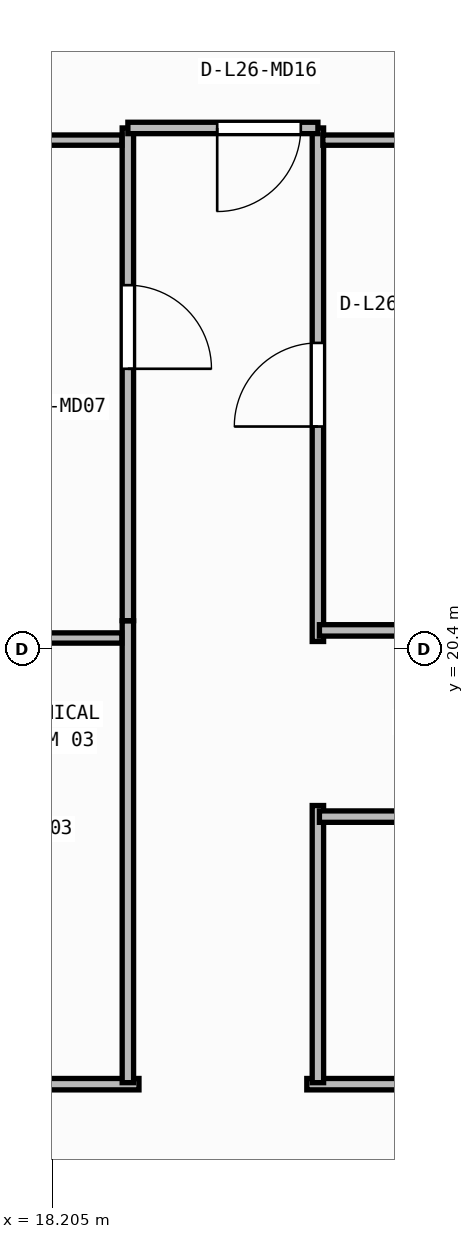
"""IFC4 building model, lengths in metres.
Left out: names, types, materials, properties, quantities, classifications, styles, units other than length and angle.
Written with IfcOpenShell. Run it as: python <this file> out.ifc"""

import sys

from ifc_helpers import new_model, si_unit, direction, frame, frame_2d, origin, place, context, subcontext, project, spatial, rectangle, extrude, element, fill, save


model = new_model("IFC4")
c1 = context("Model", 3, precision=1e-05, world=origin(), true_north=direction((0.0, 1.0)))
c2 = subcontext(c1, "Body", "Model", "MODEL_VIEW")
j1 = project(units=[si_unit("LENGTHUNIT", "METRE"), si_unit("PLANEANGLEUNIT", "RADIAN")], contexts=[c1])
p1 = place(None, origin())
s1 = spatial("IfcSite", under=j1, at=p1, CompositionType="ELEMENT")
p2 = place(p1, origin())
s2 = spatial("IfcBuilding", under=s1, at=p2, CompositionType="ELEMENT")
p3 = place(p2, frame((0.0, 0.0, 107.3)))
s3 = spatial("IfcBuildingStorey", under=s2, at=p3, CompositionType="ELEMENT", Elevation=107.3)
p4 = place(p3, frame((19.346, 14.68, 0.0), z_axis=(0.0, 0.0, 1.0), x_axis=(-1.0, 0.0, 0.0)))
e1 = element("IfcWall", 1, at=p4, inside=s3, PredefinedType="PARTITIONING", context=c2, shape_type="SweptSolid", body=[
    extrude(rectangle(XDim=4.778, YDim=0.15, at=frame_2d((2.389, 0.0))), origin(), (0.0, 0.0, 1.0), 3.71),
])
p5 = place(p4, frame((1.839, 0.0, 0.0)))
e2 = element("IfcOpeningElement", 2, at=p5, cuts=e1, PredefinedType="OPENING", context=c2, shape_type="SweptSolid", body=[
    extrude(rectangle(XDim=1.1, YDim=2.1, at=frame_2d((0.55, 1.05))), frame((0.0, 0.085, 0.0), z_axis=(0.0, -1.0, 0.0), x_axis=(1.0, 0.0, 0.0)), (0.0, 0.0, 1.0), 0.17),
])
p6 = place(p3, frame((32.006, 14.68, 0.0), z_axis=(0.0, 0.0, 1.0), x_axis=(-1.0, 0.0, 0.0)))
e3 = element("IfcWall", 3, at=p6, inside=s3, PredefinedType="PARTITIONING", context=c2, shape_type="SweptSolid", body=[
    extrude(rectangle(XDim=10.452, YDim=0.15, at=frame_2d((5.226, 0.0))), origin(), (0.0, 0.0, 1.0), 3.71),
])
p7 = place(p6, frame((4.676, 0.0, 0.0)))
e4 = element("IfcOpeningElement", 4, at=p7, cuts=e3, PredefinedType="OPENING", context=c2, shape_type="SweptSolid", body=[
    extrude(rectangle(XDim=1.1, YDim=2.1, at=frame_2d((0.55, 1.05))), frame((0.0, 0.085, 0.0), z_axis=(0.0, -1.0, 0.0), x_axis=(1.0, 0.0, 0.0)), (0.0, 0.0, 1.0), 0.17),
])
p8 = place(p3, frame((19.2, 20.776, 0.0), z_axis=(0.0, 0.0, 1.0), x_axis=(0.0, -1.0, 0.0)))
e5 = element("IfcWall", 5, at=p8, inside=s3, PredefinedType="PARTITIONING", context=c2, shape_type="SweptSolid", body=[
    extrude(rectangle(XDim=6.076, YDim=0.15, at=frame_2d((3.038, 0.0))), origin(), (0.0, 0.0, 1.0), 3.71),
])
p9 = place(p3, frame((21.7, 14.7, 0.0), z_axis=(0.0, 0.0, 1.0), x_axis=(0.0, 1.0, 0.0)))
e6 = element("IfcWall", 6, at=p9, inside=s3, PredefinedType="PARTITIONING", context=c2, shape_type="SweptSolid", body=[
    extrude(rectangle(XDim=3.646, YDim=0.15, at=frame_2d((1.823, 0.0))), origin(), (0.0, 0.0, 1.0), 3.71),
])
p10 = place(p3, frame((19.2, 27.26, 0.0), z_axis=(0.0, 0.0, 1.0), x_axis=(0.0, -1.0, 0.0)))
e7 = element("IfcWall", 7, at=p10, inside=s3, PredefinedType="PARTITIONING", context=c2, shape_type="SweptSolid", body=[
    extrude(rectangle(XDim=6.482, YDim=0.15, at=frame_2d((3.241, 0.0))), origin(), (0.0, 0.0, 1.0), 3.71),
])
p11 = place(p10, frame((2.068, 0.0, 0.0)))
e8 = element("IfcOpeningElement", 8, at=p11, cuts=e7, PredefinedType="OPENING", context=c2, shape_type="SweptSolid", body=[
    extrude(rectangle(XDim=1.1, YDim=2.1, at=frame_2d((0.55, 1.05))), frame((0.0, 0.085, 0.0), z_axis=(0.0, -1.0, 0.0), x_axis=(1.0, 0.0, 0.0)), (0.0, 0.0, 1.0), 0.17),
])
p12 = place(p3, frame((21.7, 20.504, 0.0), z_axis=(0.0, 0.0, 1.0), x_axis=(0.0, 1.0, 0.0)))
e9 = element("IfcWall", 9, at=p12, inside=s3, PredefinedType="PARTITIONING", context=c2, shape_type="SweptSolid", body=[
    extrude(rectangle(XDim=6.756, YDim=0.15, at=frame_2d((3.378, 0.0))), origin(), (0.0, 0.0, 1.0), 3.71),
])
p13 = place(p12, frame((2.828, 0.0, 0.0)))
e10 = element("IfcOpeningElement", 10, at=p13, cuts=e9, PredefinedType="OPENING", context=c2, shape_type="SweptSolid", body=[
    extrude(rectangle(XDim=1.1, YDim=2.1, at=frame_2d((0.55, 1.05))), frame((0.0, 0.085, 0.0), z_axis=(0.0, -1.0, 0.0), x_axis=(1.0, 0.0, 0.0)), (0.0, 0.0, 1.0), 0.17),
])
p14 = place(p3, frame((21.7, 27.26, 0.0), z_axis=(0.0, 0.0, 1.0), x_axis=(-1.0, 0.0, 0.0)))
e11 = element("IfcWall", 11, at=p14, inside=s3, PredefinedType="PARTITIONING", context=c2, shape_type="SweptSolid", body=[
    extrude(rectangle(XDim=2.5, YDim=0.15, at=frame_2d((1.25, 0.0))), origin(), (0.0, 0.0, 1.0), 3.71),
])
p15 = place(p14, frame((0.225, 0.0, 0.0)))
e12 = element("IfcOpeningElement", 12, at=p15, cuts=e11, PredefinedType="OPENING", context=c2, shape_type="SweptSolid", body=[
    extrude(rectangle(XDim=1.1, YDim=2.1, at=frame_2d((0.55, 1.05))), frame((0.0, 0.085, 0.0), z_axis=(0.0, -1.0, 0.0), x_axis=(1.0, 0.0, 0.0)), (0.0, 0.0, 1.0), 0.17),
])
p16 = place(p3, frame((21.72, 18.2, 0.0), z_axis=(0.0, 0.0, 1.0), x_axis=(1.0, 0.0, 0.0)))
e13 = element("IfcWall", 13, at=p16, inside=s3, PredefinedType="PARTITIONING", context=c2, shape_type="SweptSolid", body=[
    extrude(rectangle(XDim=10.286, YDim=0.15, at=frame_2d((5.143, 0.0))), origin(), (0.0, 0.0, 1.0), 3.71),
])
p17 = place(p3, frame((26.916, 20.65, 0.0), z_axis=(0.0, 0.0, 1.0), x_axis=(-1.0, 0.0, 0.0)))
e14 = element("IfcWall", 14, at=p17, inside=s3, PredefinedType="PARTITIONING", context=c2, shape_type="SweptSolid", body=[
    extrude(rectangle(XDim=5.196, YDim=0.15, at=frame_2d((2.598, 0.0))), origin(), (0.0, 0.0, 1.0), 3.083),
])
p18 = place(p3, frame((19.12, 20.55, 0.0), z_axis=(0.0, 0.0, 1.0), x_axis=(-1.0, 0.0, 0.0)))
e15 = element("IfcWall", 15, at=p18, inside=s3, PredefinedType="PARTITIONING", context=c2, shape_type="SweptSolid", body=[
    extrude(rectangle(XDim=4.723, YDim=0.135, at=frame_2d((2.361, 0.0))), origin(), (0.0, 0.0, 1.0), 3.083),
])
p19 = place(p3, frame((19.12, 27.1, 0.0), z_axis=(0.0, 0.0, 1.0), x_axis=(-1.0, 0.0, 0.0)))
e16 = element("IfcWall", 16, at=p19, inside=s3, PredefinedType="PARTITIONING", context=c2, shape_type="SweptSolid", body=[
    extrude(rectangle(XDim=6.03, YDim=0.135, at=frame_2d((3.015, 0.0))), origin(), (0.0, 0.0, 1.0), 3.71),
])
p20 = place(p3, frame((26.69, 27.1, 0.0), z_axis=(0.0, 0.0, 1.0), x_axis=(-1.0, 0.0, 0.0)))
e17 = element("IfcWall", 17, at=p20, inside=s3, PredefinedType="PARTITIONING", context=c2, shape_type="SweptSolid", body=[
    extrude(rectangle(XDim=4.925, YDim=0.135, at=frame_2d((2.462, 0.0))), origin(), (0.0, 0.0, 1.0), 3.71),
])
p21 = place(p11, origin())
e18 = element("IfcDoor", 18, at=p21, inside=s3, OperationType="SINGLE_SWING_RIGHT", PredefinedType="DOOR", context=c2, shape_type="SweptSolid", body=[
    extrude(rectangle(XDim=1.1, YDim=2.1, at=frame_2d((0.55, 1.05))), frame((0.0, 0.025, 0.0), z_axis=(0.0, -1.0, 0.0), x_axis=(1.0, 0.0, 0.0)), (0.0, 0.0, 1.0), 0.05),
])
fill(e8, e18)
p22 = place(p13, origin())
e19 = element("IfcDoor", 19, at=p22, inside=s3, OperationType="SINGLE_SWING_LEFT", PredefinedType="DOOR", context=c2, shape_type="SweptSolid", body=[
    extrude(rectangle(XDim=1.1, YDim=2.1, at=frame_2d((0.55, 1.05))), frame((0.0, 0.025, 0.0), z_axis=(0.0, -1.0, 0.0), x_axis=(1.0, 0.0, 0.0)), (0.0, 0.0, 1.0), 0.05),
])
fill(e10, e19)
p23 = place(p15, origin())
e20 = element("IfcDoor", 20, at=p23, inside=s3, OperationType="SINGLE_SWING_RIGHT", PredefinedType="DOOR", context=c2, shape_type="SweptSolid", body=[
    extrude(rectangle(XDim=1.1, YDim=2.1, at=frame_2d((0.55, 1.05))), frame((0.0, 0.025, 0.0), z_axis=(0.0, -1.0, 0.0), x_axis=(1.0, 0.0, 0.0)), (0.0, 0.0, 1.0), 0.05),
])
fill(e12, e20)
save(model, sys.argv[1])
